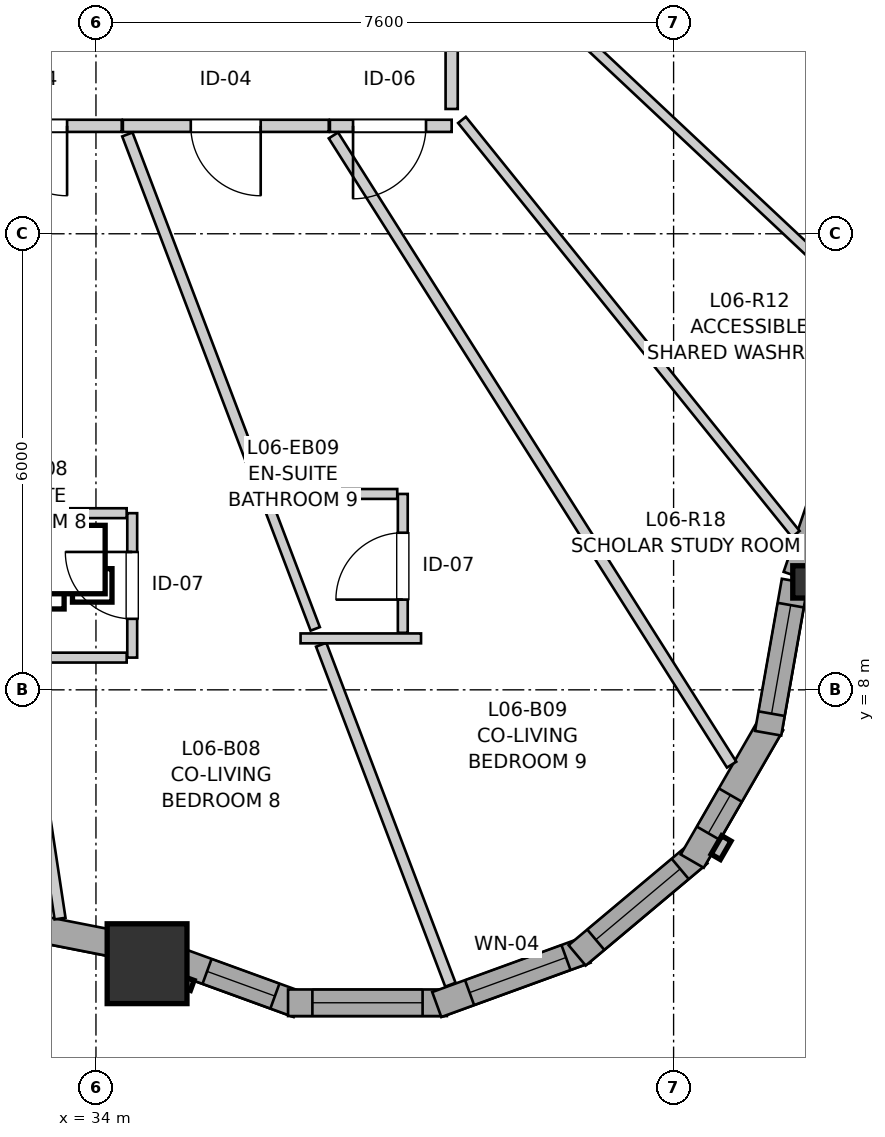
"""IFC4 building model, lengths in metres.
Left out: names, types, materials, properties, quantities, classifications, styles, units other than length and angle.
Written with IfcOpenShell. Run it as: python <this file> out.ifc"""

import sys

from ifc_helpers import new_model, si_unit, direction, frame, frame_2d, origin, origin_2d, place, context, subcontext, project, spatial, rectangle, i_section, extrude, source, transform, mapped, element, fill, save


model = new_model("IFC4")
c1 = context("Model", 3, precision=1e-05, world=origin(), true_north=direction((0.0, 1.0)))
c2 = subcontext(c1, "Body", "Model", "MODEL_VIEW")
j1 = project(units=[si_unit("LENGTHUNIT", "METRE"), si_unit("PLANEANGLEUNIT", "RADIAN")], contexts=[c1])
p1 = place(None, origin())
s1 = spatial("IfcSite", under=j1, at=p1, CompositionType="ELEMENT")
p2 = place(p1, origin())
s2 = spatial("IfcBuilding", under=s1, at=p2, CompositionType="ELEMENT")
p3 = place(p2, frame((0.0, 0.0, 23.8)))
s3 = spatial("IfcBuildingStorey", under=s2, at=p3, CompositionType="ELEMENT", Elevation=23.8)
m1 = source(origin(), c2, "Body", "SweptSolid", [
    extrude(rectangle(XDim=1.05, YDim=1.05, at=origin_2d()), origin(), (0.0, 0.0, 1.0), 2.935),
])
p4 = place(p3, frame((34.673, 4.397, 0.0), z_axis=(0.0, 0.0, 1.0), x_axis=(1.0, 0.0, 0.0)))
e1 = element("IfcColumn", 1, at=p4, inside=s3, PredefinedType="COLUMN", context=c2, shape_type="MappedRepresentation", body=[
    mapped(m1, transform((0.0, 0.0, 0.0), x_axis=(1.0, 0.0, 0.0), y_axis=(0.0, 1.0, 0.0), z_axis=(0.0, 0.0, 1.0), scale=1.0)),
])
m2 = source(origin(), c2, "Body", "SweptSolid", [
    extrude(i_section(OverallWidth=0.409, OverallDepth=0.425, WebThickness=0.03, FlangeThickness=0.048, FilletRadius=0.015, at=origin_2d()), origin(), (0.0, 0.0, 1.0), 2.935),
])
p5 = place(p3, frame((43.373, 9.42, 0.0), z_axis=(0.0, 0.0, 1.0), x_axis=(1.0, 0.0, 0.0)))
e2 = element("IfcColumn", 2, at=p5, inside=s3, PredefinedType="PILASTER", context=c2, shape_type="MappedRepresentation", body=[
    mapped(m2, transform((0.0, 0.0, 0.0), x_axis=(1.0, 0.0, 0.0), y_axis=(0.0, 1.0, 0.0), z_axis=(0.0, 0.0, 1.0), scale=1.0)),
])
p6 = place(p3, frame((31.23, 5.252, 0.0), z_axis=(0.0, 0.0, 1.0), x_axis=(0.981232542219, -0.192828156892, 0.0)))
e3 = element("IfcWall", 3, at=p6, inside=s3, PredefinedType="SOLIDWALL", context=c2, shape_type="SweptSolid", body=[
    extrude(rectangle(XDim=3.242, YDim=0.35, at=frame_2d((1.621, 0.0))), origin(), (0.0, 0.0, 1.0), 2.415),
])
p7 = place(p6, frame((0.471, 0.0, 0.82)))
e4 = element("IfcOpeningElement", 4, at=p7, cuts=e3, PredefinedType="OPENING", context=c2, shape_type="SweptSolid", body=[
    extrude(rectangle(XDim=1.45, YDim=1.25, at=frame_2d((0.725, 0.625))), frame((0.0, 0.185, 0.0), z_axis=(0.0, -1.0, 0.0), x_axis=(1.0, 0.0, 0.0)), (0.0, 0.0, 1.0), 0.37),
])
p8 = place(p3, frame((35.014, 4.459, 0.0), z_axis=(0.0, 0.0, 1.0), x_axis=(0.939720171257, -0.341944439541, 0.0)))
e5 = element("IfcWall", 5, at=p8, inside=s3, PredefinedType="SOLIDWALL", context=c2, shape_type="SweptSolid", body=[
    extrude(rectangle(XDim=1.752, YDim=0.35, at=frame_2d((0.876, 0.0))), origin(), (0.0, 0.0, 1.0), 2.415),
])
p9 = place(p8, frame((0.476, 0.0, 0.82)))
e6 = element("IfcOpeningElement", 6, at=p9, cuts=e5, PredefinedType="OPENING", context=c2, shape_type="SweptSolid", body=[
    extrude(rectangle(XDim=0.95, YDim=1.35, at=frame_2d((0.475, 0.675))), frame((0.0, 0.185, 0.0), z_axis=(0.0, -1.0, 0.0), x_axis=(1.0, 0.0, 0.0)), (0.0, 0.0, 1.0), 0.37),
])
p10 = place(p3, frame((36.527, 3.883, 0.0), z_axis=(0.0, 0.0, 1.0), x_axis=(1.0, 0.0, 0.0)))
e7 = element("IfcWall", 7, at=p10, inside=s3, PredefinedType="SOLIDWALL", context=c2, shape_type="SweptSolid", body=[
    extrude(rectangle(XDim=2.09, YDim=0.35, at=frame_2d((1.045, 0.0))), origin(), (0.0, 0.0, 1.0), 2.415),
])
p11 = place(p10, frame((0.32, 0.0, 0.82)))
e8 = element("IfcOpeningElement", 8, at=p11, cuts=e7, PredefinedType="OPENING", context=c2, shape_type="SweptSolid", body=[
    extrude(rectangle(XDim=1.45, YDim=1.25, at=frame_2d((0.725, 0.625))), frame((0.0, 0.185, 0.0), z_axis=(0.0, -1.0, 0.0), x_axis=(1.0, 0.0, 0.0)), (0.0, 0.0, 1.0), 0.37),
])
p12 = place(p3, frame((38.484, 3.86, 0.0), z_axis=(0.0, 0.0, 1.0), x_axis=(0.939711556618, 0.341968113072, 0.0)))
e9 = element("IfcWall", 9, at=p12, inside=s3, PredefinedType="SOLIDWALL", context=c2, shape_type="SweptSolid", body=[
    extrude(rectangle(XDim=2.09, YDim=0.35, at=frame_2d((1.045, 0.0))), origin(), (0.0, 0.0, 1.0), 2.415),
])
p13 = place(p12, frame((0.459, 0.0, 0.82)))
e10 = element("IfcOpeningElement", 10, at=p13, cuts=e9, PredefinedType="OPENING", context=c2, shape_type="SweptSolid", body=[
    extrude(rectangle(XDim=1.35, YDim=1.45, at=frame_2d((0.675, 0.725))), frame((0.0, 0.185, 0.0), z_axis=(0.0, -1.0, 0.0), x_axis=(1.0, 0.0, 0.0)), (0.0, 0.0, 1.0), 0.37),
])
p14 = place(p3, frame((40.331, 4.507, 0.0), z_axis=(0.0, 0.0, 1.0), x_axis=(0.766024572719, 0.642811289563, 0.0)))
e11 = element("IfcWall", 11, at=p14, inside=s3, PredefinedType="SOLIDWALL", context=c2, shape_type="SweptSolid", body=[
    extrude(rectangle(XDim=2.09, YDim=0.35, at=frame_2d((1.045, 0.0))), origin(), (0.0, 0.0, 1.0), 2.415),
])
p15 = place(p14, frame((0.32, 0.0, 0.82)))
e12 = element("IfcOpeningElement", 12, at=p15, cuts=e11, PredefinedType="OPENING", context=c2, shape_type="SweptSolid", body=[
    extrude(rectangle(XDim=1.45, YDim=1.25, at=frame_2d((0.725, 0.625))), frame((0.0, 0.185, 0.0), z_axis=(0.0, -1.0, 0.0), x_axis=(1.0, 0.0, 0.0)), (0.0, 0.0, 1.0), 0.37),
])
p16 = place(p3, frame((41.845, 5.746, 0.0), z_axis=(0.0, 0.0, 1.0), x_axis=(0.499995423472, 0.866028046028, 0.0)))
e13 = element("IfcWall", 13, at=p16, inside=s3, PredefinedType="SOLIDWALL", context=c2, shape_type="SweptSolid", body=[
    extrude(rectangle(XDim=2.09, YDim=0.35, at=frame_2d((1.045, 0.0))), origin(), (0.0, 0.0, 1.0), 2.415),
])
p17 = place(p16, frame((0.424, 0.0, 0.82)))
e14 = element("IfcOpeningElement", 14, at=p17, cuts=e13, PredefinedType="OPENING", context=c2, shape_type="SweptSolid", body=[
    extrude(rectangle(XDim=0.58, YDim=1.35, at=frame_2d((0.29, 0.675))), frame((0.0, 0.185, 0.0), z_axis=(0.0, -1.0, 0.0), x_axis=(1.0, 0.0, 0.0)), (0.0, 0.0, 1.0), 0.37),
])
p18 = place(p3, frame((42.844, 7.429, 0.0), z_axis=(0.0, 0.0, 1.0), x_axis=(0.17370309897, 0.984798067326, 0.0)))
e15 = element("IfcWall", 15, at=p18, inside=s3, PredefinedType="SOLIDWALL", context=c2, shape_type="SweptSolid", body=[
    extrude(rectangle(XDim=2.032, YDim=0.35, at=frame_2d((1.016, 0.0))), origin(), (0.0, 0.0, 1.0), 2.415),
])
p19 = place(p18, frame((0.261, 0.0, 0.82)))
e16 = element("IfcOpeningElement", 16, at=p19, cuts=e15, PredefinedType="OPENING", context=c2, shape_type="SweptSolid", body=[
    extrude(rectangle(XDim=1.45, YDim=1.25, at=frame_2d((0.725, 0.625))), frame((0.0, 0.185, 0.0), z_axis=(0.0, -1.0, 0.0), x_axis=(1.0, 0.0, 0.0)), (0.0, 0.0, 1.0), 0.37),
])
p20 = place(p3, frame((43.213, 9.496, 0.0), z_axis=(0.0, 0.0, 1.0), x_axis=(0.323599506414, 0.946194144692, 0.0)))
e17 = element("IfcWall", 17, at=p20, inside=s3, PredefinedType="SOLIDWALL", context=c2, shape_type="SweptSolid", body=[
    extrude(rectangle(XDim=3.522, YDim=0.35, at=frame_2d((1.761, 0.0))), origin(), (0.0, 0.0, 1.0), 2.415),
])
p21 = place(p20, frame((1.351, 0.0, 0.82)))
e18 = element("IfcOpeningElement", 18, at=p21, cuts=e17, PredefinedType="OPENING", context=c2, shape_type="SweptSolid", body=[
    extrude(rectangle(XDim=1.25, YDim=1.35, at=frame_2d((0.625, 0.675))), frame((0.0, 0.185, 0.0), z_axis=(0.0, -1.0, 0.0), x_axis=(1.0, 0.0, 0.0)), (0.0, 0.0, 1.0), 0.37),
])
p22 = place(p3, frame((37.063, 15.42, 0.0), z_axis=(0.0, 0.0, 1.0), x_axis=(-1.0, 0.0, 0.0)))
e19 = element("IfcWall", 19, at=p22, inside=s3, PredefinedType="PARTITIONING", context=c2, shape_type="SweptSolid", body=[
    extrude(rectangle(XDim=2.709, YDim=0.16, at=frame_2d((1.354, 0.0))), origin(), (0.0, 0.0, 1.0), 2.935),
])
p23 = place(p22, frame((0.896, 0.0, 0.0)))
e20 = element("IfcOpeningElement", 20, at=p23, cuts=e19, PredefinedType="OPENING", context=c2, shape_type="SweptSolid", body=[
    extrude(rectangle(XDim=0.92, YDim=2.1, at=frame_2d((0.46, 1.05))), frame((0.0, 0.09, 0.0), z_axis=(0.0, -1.0, 0.0), x_axis=(1.0, 0.0, 0.0)), (0.0, 0.0, 1.0), 0.18),
])
p24 = place(p3, frame((38.68, 18.147, 0.0), z_axis=(0.0, 0.0, 1.0), x_axis=(0.0, -1.0, 0.0)))
e21 = element("IfcWall", 21, at=p24, inside=s3, PredefinedType="PARTITIONING", context=c2, shape_type="SweptSolid", body=[
    extrude(rectangle(XDim=2.505, YDim=0.16, at=frame_2d((1.252, 0.0))), origin(), (0.0, 0.0, 1.0), 2.935),
])
p25 = place(p24, frame((0.748, 0.0, 0.0)))
e22 = element("IfcOpeningElement", 22, at=p25, cuts=e21, PredefinedType="OPENING", context=c2, shape_type="SweptSolid", body=[
    extrude(rectangle(XDim=0.95, YDim=2.1, at=frame_2d((0.475, 1.05))), frame((0.0, 0.09, 0.0), z_axis=(0.0, -1.0, 0.0), x_axis=(1.0, 0.0, 0.0)), (0.0, 0.0, 1.0), 0.18),
])
p26 = place(p3, frame((34.339, 15.42, 0.0), z_axis=(0.0, 0.0, 1.0), x_axis=(-1.0, 0.0, 0.0)))
e23 = element("IfcWall", 23, at=p26, inside=s3, PredefinedType="PARTITIONING", context=c2, shape_type="SweptSolid", body=[
    extrude(rectangle(XDim=2.359, YDim=0.16, at=frame_2d((1.18, 0.0))), origin(), (0.0, 0.0, 1.0), 2.935),
])
p27 = place(p26, frame((0.719, 0.0, 0.0)))
e24 = element("IfcOpeningElement", 24, at=p27, cuts=e23, PredefinedType="OPENING", context=c2, shape_type="SweptSolid", body=[
    extrude(rectangle(XDim=0.92, YDim=2.1, at=frame_2d((0.46, 1.05))), frame((0.0, 0.09, 0.0), z_axis=(0.0, -1.0, 0.0), x_axis=(1.0, 0.0, 0.0)), (0.0, 0.0, 1.0), 0.18),
])
p28 = place(p3, frame((34.477, 8.424, 0.0), z_axis=(0.0, 0.0, 1.0), x_axis=(0.0, 1.0, 0.0)))
e25 = element("IfcWall", 25, at=p28, inside=s3, PredefinedType="PARTITIONING", context=c2, shape_type="SweptSolid", body=[
    extrude(rectangle(XDim=1.9, YDim=0.13, at=frame_2d((0.95, 0.0))), origin(), (0.0, 0.0, 1.0), 2.935),
])
p29 = place(p28, frame((0.51, 0.0, 0.0)))
e26 = element("IfcOpeningElement", 26, at=p29, cuts=e25, PredefinedType="OPENING", context=c2, shape_type="SweptSolid", body=[
    extrude(rectangle(XDim=0.88, YDim=2.05, at=frame_2d((0.44, 1.025))), frame((0.0, 0.075, 0.0), z_axis=(0.0, -1.0, 0.0), x_axis=(1.0, 0.0, 0.0)), (0.0, 0.0, 1.0), 0.15),
])
p30 = place(p3, frame((38.037, 8.75, 0.0), z_axis=(0.0, 0.0, 1.0), x_axis=(0.0, 1.0, 0.0)))
e27 = element("IfcWall", 27, at=p30, inside=s3, PredefinedType="PARTITIONING", context=c2, shape_type="SweptSolid", body=[
    extrude(rectangle(XDim=1.827, YDim=0.13, at=frame_2d((0.914, 0.0))), origin(), (0.0, 0.0, 1.0), 2.935),
])
p31 = place(p30, frame((0.437, 0.0, 0.0)))
e28 = element("IfcOpeningElement", 28, at=p31, cuts=e27, PredefinedType="OPENING", context=c2, shape_type="SweptSolid", body=[
    extrude(rectangle(XDim=0.88, YDim=2.05, at=frame_2d((0.44, 1.025))), frame((0.0, 0.075, 0.0), z_axis=(0.0, -1.0, 0.0), x_axis=(1.0, 0.0, 0.0)), (0.0, 0.0, 1.0), 0.15),
])
p32 = place(p3, frame((38.68, 15.42, 0.0), z_axis=(0.0, 0.0, 1.0), x_axis=(-1.0, 0.0, 0.0)))
e29 = element("IfcWall", 29, at=p32, inside=s3, PredefinedType="PARTITIONING", context=c2, shape_type="SweptSolid", body=[
    extrude(rectangle(XDim=1.602, YDim=0.16, at=frame_2d((0.801, 0.0))), origin(), (0.0, 0.0, 1.0), 2.935),
])
p33 = place(p32, frame((0.337, 0.0, 0.0)))
e30 = element("IfcOpeningElement", 30, at=p33, cuts=e29, PredefinedType="OPENING", context=c2, shape_type="SweptSolid", body=[
    extrude(rectangle(XDim=0.96, YDim=2.1, at=frame_2d((0.48, 1.05))), frame((0.0, 0.09, 0.0), z_axis=(0.0, -1.0, 0.0), x_axis=(1.0, 0.0, 0.0)), (0.0, 0.0, 1.0), 0.18),
])
p34 = place(p3, frame((37.125, 15.294, 0.0), z_axis=(0.0, 0.0, 1.0), x_axis=(0.534743765269, -0.845014263492, 0.0)))
e31 = element("IfcWall", 31, at=p34, inside=s3, PredefinedType="PARTITIONING", context=c2, shape_type="SweptSolid", body=[
    extrude(rectangle(XDim=9.797, YDim=0.145, at=frame_2d((4.899, 0.0))), origin(), (0.0, 0.0, 1.0), 2.935),
])
p35 = place(p3, frame((38.81, 18.061, 0.0), z_axis=(0.0, 0.0, 1.0), x_axis=(0.729196389153, -0.684304483433, 0.0)))
e32 = element("IfcWall", 32, at=p35, inside=s3, PredefinedType="PARTITIONING", context=c2, shape_type="SweptSolid", body=[
    extrude(rectangle(XDim=7.396, YDim=0.13, at=frame_2d((3.698, 0.0))), origin(), (0.0, 0.0, 1.0), 2.935),
])
p36 = place(p3, frame((38.816, 15.498, 0.0), z_axis=(0.0, 0.0, 1.0), x_axis=(0.627528755525, -0.778593386171, 0.0)))
e33 = element("IfcWall", 33, at=p36, inside=s3, PredefinedType="PARTITIONING", context=c2, shape_type="SweptSolid", body=[
    extrude(rectangle(XDim=6.998, YDim=0.13, at=frame_2d((3.499, 0.0))), origin(), (0.0, 0.0, 1.0), 2.935),
])
p37 = place(p3, frame((34.413, 15.307, 0.0), z_axis=(0.0, 0.0, 1.0), x_axis=(0.355171610573, -0.934801116304, 0.0)))
e34 = element("IfcWall", 34, at=p37, inside=s3, PredefinedType="PARTITIONING", context=c2, shape_type="SweptSolid", body=[
    extrude(rectangle(XDim=5.177, YDim=0.145, at=frame_2d((2.589, 0.0))), origin(), (0.0, 0.0, 1.0), 2.935),
])
p38 = place(p3, frame((36.963, 8.594, 0.0), z_axis=(0.0, 0.0, 1.0), x_axis=(0.35524629266, -0.934772737916, 0.0)))
e35 = element("IfcWall", 35, at=p38, inside=s3, PredefinedType="PARTITIONING", context=c2, shape_type="SweptSolid", body=[
    extrude(rectangle(XDim=4.785, YDim=0.145, at=frame_2d((2.393, 0.0))), origin(), (0.0, 0.0, 1.0), 2.935),
])
p39 = place(p3, frame((33.006, 8.439, 0.0), z_axis=(0.0, 0.0, 1.0), x_axis=(0.149510938207, -0.988760071684, 0.0)))
e36 = element("IfcWall", 36, at=p39, inside=s3, PredefinedType="PARTITIONING", context=c2, shape_type="SweptSolid", body=[
    extrude(rectangle(XDim=3.488, YDim=0.145, at=frame_2d((1.744, 0.0))), origin(), (0.0, 0.0, 1.0), 2.935),
])
p40 = place(p3, frame((36.257, 10.453, 0.0), z_axis=(0.0, 0.0, 1.0), x_axis=(0.355345777079, -0.934734924303, 0.0)))
e37 = element("IfcWall", 37, at=p40, inside=s3, PredefinedType="PARTITIONING", context=c2, shape_type="SweptSolid", body=[
    extrude(rectangle(XDim=1.766, YDim=0.13, at=frame_2d((0.883, 0.0))), origin(), (0.0, 0.0, 1.0), 2.935),
])
p41 = place(p3, frame((36.347, 10.577, 0.0), z_axis=(0.0, 0.0, 1.0), x_axis=(1.0, 0.0, 0.0)))
e38 = element("IfcWall", 38, at=p41, inside=s3, PredefinedType="PARTITIONING", context=c2, shape_type="SweptSolid", body=[
    extrude(rectangle(XDim=1.617, YDim=0.13, at=frame_2d((0.808, 0.0))), origin(), (0.0, 0.0, 1.0), 2.935),
])
p42 = place(p3, frame((32.812, 10.324, 0.0), z_axis=(0.0, 0.0, 1.0), x_axis=(1.0, 0.0, 0.0)))
e39 = element("IfcWall", 39, at=p42, inside=s3, PredefinedType="PARTITIONING", context=c2, shape_type="SweptSolid", body=[
    extrude(rectangle(XDim=1.592, YDim=0.13, at=frame_2d((0.796, 0.0))), origin(), (0.0, 0.0, 1.0), 2.935),
])
p43 = place(p3, frame((33.099, 8.424, 0.0), z_axis=(0.0, 0.0, 1.0), x_axis=(1.0, 0.0, 0.0)))
e40 = element("IfcWall", 40, at=p43, inside=s3, PredefinedType="PARTITIONING", context=c2, shape_type="SweptSolid", body=[
    extrude(rectangle(XDim=1.305, YDim=0.13, at=frame_2d((0.652, 0.0))), origin(), (0.0, 0.0, 1.0), 2.503),
])
p44 = place(p3, frame((36.692, 8.677, 0.0), z_axis=(0.0, 0.0, 1.0), x_axis=(1.0, 0.0, 0.0)))
e41 = element("IfcWall", 41, at=p44, inside=s3, PredefinedType="PARTITIONING", context=c2, shape_type="SweptSolid", body=[
    extrude(rectangle(XDim=1.585, YDim=0.13, at=frame_2d((0.792, 0.0))), origin(), (0.0, 0.0, 1.0), 2.935),
])
m3 = source(origin(), c2, "Body", "SweptSolid", [
    extrude(rectangle(XDim=0.95, YDim=1.35, at=frame_2d((0.475, 0.675))), frame((0.0, 0.03, 0.0), z_axis=(0.0, -1.0, 0.0), x_axis=(1.0, 0.0, 0.0)), (0.0, 0.0, 1.0), 0.06),
])
p45 = place(p9, origin())
e42 = element("IfcWindow", 42, at=p45, inside=s3, PartitioningType="SINGLE_PANEL", PredefinedType="WINDOW", context=c2, shape_type="MappedRepresentation", body=[
    mapped(m3, transform((0.0, 0.0, 0.0), x_axis=(1.0, 0.0, 0.0), y_axis=(0.0, 1.0, 0.0), z_axis=(0.0, 0.0, 1.0), scale=1.0)),
])
fill(e6, e42)
m4 = source(origin(), c2, "Body", "SweptSolid", [
    extrude(rectangle(XDim=1.45, YDim=1.25, at=frame_2d((0.725, 0.625))), frame((0.0, 0.03, 0.0), z_axis=(0.0, -1.0, 0.0), x_axis=(1.0, 0.0, 0.0)), (0.0, 0.0, 1.0), 0.06),
])
p46 = place(p11, origin())
e43 = element("IfcWindow", 43, at=p46, inside=s3, PartitioningType="SINGLE_PANEL", PredefinedType="WINDOW", context=c2, shape_type="MappedRepresentation", body=[
    mapped(m4, transform((0.0, 0.0, 0.0), x_axis=(1.0, 0.0, 0.0), y_axis=(0.0, 1.0, 0.0), z_axis=(0.0, 0.0, 1.0), scale=1.0)),
])
fill(e8, e43)
m5 = source(origin(), c2, "Body", "SweptSolid", [
    extrude(rectangle(XDim=1.35, YDim=1.45, at=frame_2d((0.675, 0.725))), frame((0.0, 0.03, 0.0), z_axis=(0.0, -1.0, 0.0), x_axis=(1.0, 0.0, 0.0)), (0.0, 0.0, 1.0), 0.06),
])
p47 = place(p13, origin())
e44 = element("IfcWindow", 44, at=p47, inside=s3, PartitioningType="SINGLE_PANEL", PredefinedType="WINDOW", context=c2, shape_type="MappedRepresentation", body=[
    mapped(m5, transform((0.0, 0.0, 0.0), x_axis=(1.0, 0.0, 0.0), y_axis=(0.0, 1.0, 0.0), z_axis=(0.0, 0.0, 1.0), scale=1.0)),
])
fill(e10, e44)
p48 = place(p15, origin())
e45 = element("IfcWindow", 45, at=p48, inside=s3, PartitioningType="SINGLE_PANEL", PredefinedType="WINDOW", context=c2, shape_type="MappedRepresentation", body=[
    mapped(m4, transform((0.0, 0.0, 0.0), x_axis=(1.0, 0.0, 0.0), y_axis=(0.0, 1.0, 0.0), z_axis=(0.0, 0.0, 1.0), scale=1.0)),
])
fill(e12, e45)
m6 = source(origin(), c2, "Body", "SweptSolid", [
    extrude(rectangle(XDim=0.58, YDim=1.35, at=frame_2d((0.29, 0.675))), frame((0.0, 0.03, 0.0), z_axis=(0.0, -1.0, 0.0), x_axis=(1.0, 0.0, 0.0)), (0.0, 0.0, 1.0), 0.06),
])
p49 = place(p17, origin())
e46 = element("IfcWindow", 46, at=p49, inside=s3, PartitioningType="SINGLE_PANEL", PredefinedType="WINDOW", context=c2, shape_type="MappedRepresentation", body=[
    mapped(m6, transform((0.0, 0.0, 0.0), x_axis=(1.0, 0.0, 0.0), y_axis=(0.0, 1.0, 0.0), z_axis=(0.0, 0.0, 1.0), scale=1.0)),
])
fill(e14, e46)
p50 = place(p19, origin())
e47 = element("IfcWindow", 47, at=p50, inside=s3, PartitioningType="SINGLE_PANEL", PredefinedType="WINDOW", context=c2, shape_type="MappedRepresentation", body=[
    mapped(m4, transform((0.0, 0.0, 0.0), x_axis=(1.0, 0.0, 0.0), y_axis=(0.0, 1.0, 0.0), z_axis=(0.0, 0.0, 1.0), scale=1.0)),
])
fill(e16, e47)
m7 = source(origin(), c2, "Body", "SweptSolid", [
    extrude(rectangle(XDim=0.92, YDim=2.1, at=frame_2d((0.46, 1.05))), frame((0.0, 0.025, 0.0), z_axis=(0.0, -1.0, 0.0), x_axis=(1.0, 0.0, 0.0)), (0.0, 0.0, 1.0), 0.05),
])
p51 = place(p23, origin())
e48 = element("IfcDoor", 48, at=p51, inside=s3, OperationType="SINGLE_SWING_LEFT", PredefinedType="DOOR", context=c2, shape_type="MappedRepresentation", body=[
    mapped(m7, transform((0.0, 0.0, 0.0), x_axis=(1.0, 0.0, 0.0), y_axis=(0.0, 1.0, 0.0), z_axis=(0.0, 0.0, 1.0), scale=1.0)),
])
fill(e20, e48)
p52 = place(p27, origin())
e49 = element("IfcDoor", 49, at=p52, inside=s3, OperationType="SINGLE_SWING_LEFT", PredefinedType="DOOR", context=c2, shape_type="MappedRepresentation", body=[
    mapped(m7, transform((0.0, 0.0, 0.0), x_axis=(1.0, 0.0, 0.0), y_axis=(0.0, 1.0, 0.0), z_axis=(0.0, 0.0, 1.0), scale=1.0)),
])
fill(e24, e49)
m8 = source(origin(), c2, "Body", "SweptSolid", [
    extrude(rectangle(XDim=0.88, YDim=2.05, at=frame_2d((0.44, 1.025))), frame((0.0, 0.025, 0.0), z_axis=(0.0, -1.0, 0.0), x_axis=(1.0, 0.0, 0.0)), (0.0, 0.0, 1.0), 0.05),
])
p53 = place(p29, origin())
e50 = element("IfcDoor", 50, at=p53, inside=s3, OperationType="SINGLE_SWING_RIGHT", PredefinedType="DOOR", context=c2, shape_type="MappedRepresentation", body=[
    mapped(m8, transform((0.0, 0.0, 0.0), x_axis=(1.0, 0.0, 0.0), y_axis=(0.0, 1.0, 0.0), z_axis=(0.0, 0.0, 1.0), scale=1.0)),
])
fill(e26, e50)
p54 = place(p31, origin())
e51 = element("IfcDoor", 51, at=p54, inside=s3, OperationType="SINGLE_SWING_LEFT", PredefinedType="DOOR", context=c2, shape_type="MappedRepresentation", body=[
    mapped(m8, transform((0.0, 0.0, 0.0), x_axis=(1.0, 0.0, 0.0), y_axis=(0.0, 1.0, 0.0), z_axis=(0.0, 0.0, 1.0), scale=1.0)),
])
fill(e28, e51)
m9 = source(origin(), c2, "Body", "SweptSolid", [
    extrude(rectangle(XDim=0.96, YDim=2.1, at=frame_2d((0.48, 1.05))), frame((0.0, 0.025, 0.0), z_axis=(0.0, -1.0, 0.0), x_axis=(1.0, 0.0, 0.0)), (0.0, 0.0, 1.0), 0.05),
])
p55 = place(p33, origin())
e52 = element("IfcDoor", 52, at=p55, inside=s3, OperationType="SINGLE_SWING_RIGHT", PredefinedType="DOOR", context=c2, shape_type="MappedRepresentation", body=[
    mapped(m9, transform((0.0, 0.0, 0.0), x_axis=(1.0, 0.0, 0.0), y_axis=(0.0, 1.0, 0.0), z_axis=(0.0, 0.0, 1.0), scale=1.0)),
])
fill(e30, e52)
save(model, sys.argv[1])
